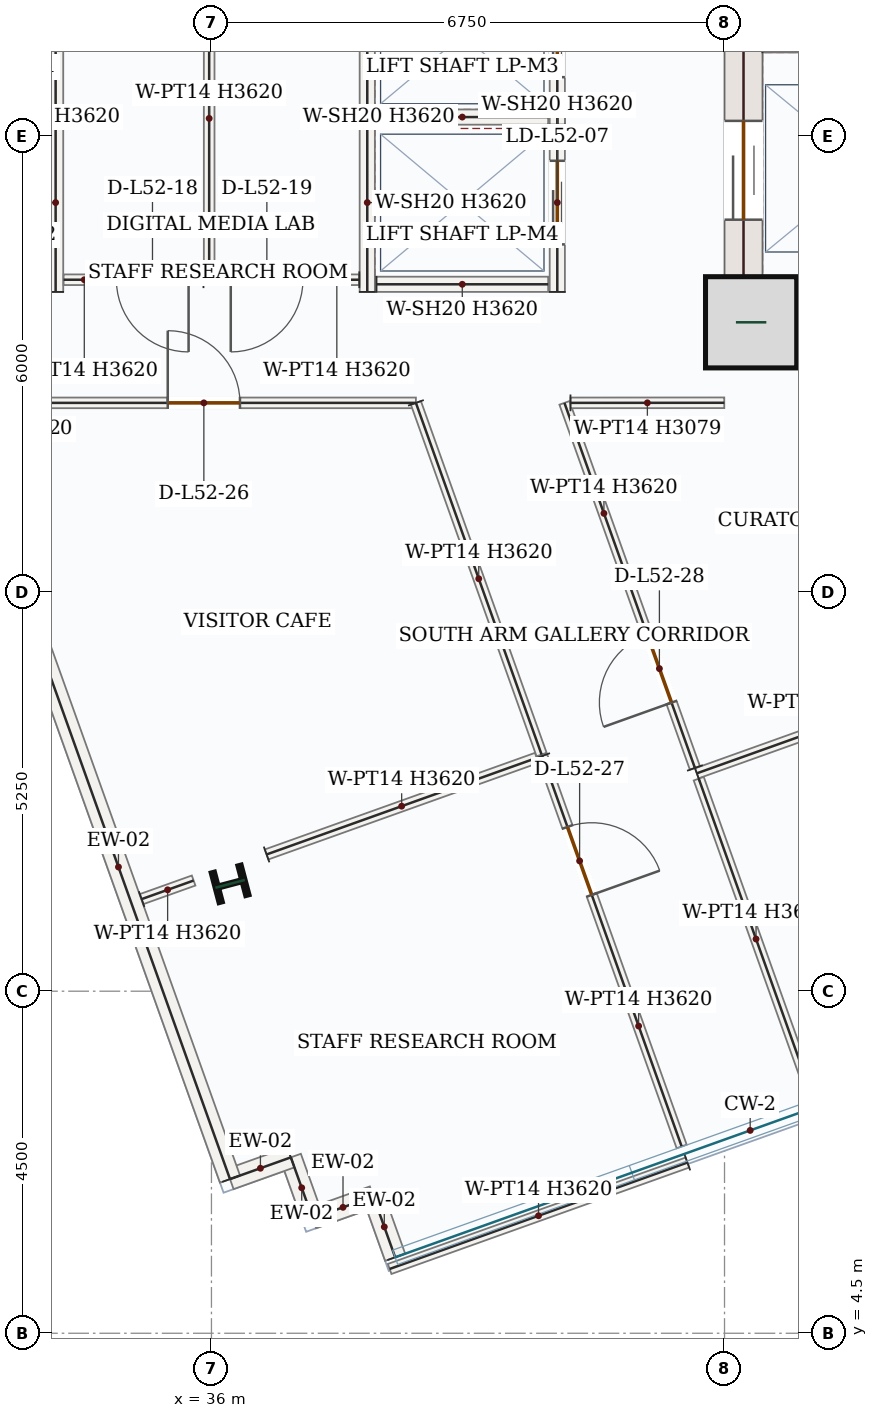
"""IFC4 building model, lengths in metres.
Left out: names, types, materials, properties, quantities, classifications, styles, units other than length and angle.
Written with IfcOpenShell. Run it as: python <this file> out.ifc"""

import sys

from ifc_helpers import new_model, si_unit, direction, frame, frame_2d, origin, origin_2d, place, context, subcontext, project, spatial, rectangle, i_section, extrude, source, transform, mapped, element, fill, save


model = new_model("IFC4")
c1 = context("Model", 3, precision=1e-05, world=origin(), true_north=direction((0.0, 1.0)))
c2 = subcontext(c1, "Body", "Model", "MODEL_VIEW")
j1 = project(units=[si_unit("LENGTHUNIT", "METRE"), si_unit("PLANEANGLEUNIT", "RADIAN")], contexts=[c1])
p1 = place(None, origin())
s1 = spatial("IfcSite", under=j1, at=p1, CompositionType="ELEMENT")
p2 = place(p1, origin())
s2 = spatial("IfcBuilding", under=s1, at=p2, CompositionType="ELEMENT")
p3 = place(p2, frame((0.0, 0.0, 221.4)))
s3 = spatial("IfcBuildingStorey", under=s2, at=p3, CompositionType="ELEMENT", Elevation=221.4)
p4 = place(p3, frame((43.0, 17.4, 0.0), z_axis=(0.0, 0.0, 1.0), x_axis=(0.0, 1.0, 0.0)))
e1 = element("IfcWall", 1, at=p4, inside=s3, PredefinedType="SHEAR", context=c2, shape_type="SweptSolid", body=[
    extrude(rectangle(XDim=8.55, YDim=0.5, at=frame_2d((4.275, 0.0))), origin(), (0.0, 0.0, 1.0), 3.62),
])
p5 = place(p4, frame((6.65, 0.0, 0.0)))
e2 = element("IfcOpeningElement", 2, at=p5, cuts=e1, PredefinedType="OPENING", context=c2, shape_type="SweptSolid", body=[
    extrude(rectangle(XDim=1.1, YDim=2.2, at=frame_2d((0.55, 1.1))), frame((0.0, 0.26, 0.0), z_axis=(0.0, -1.0, 0.0), x_axis=(1.0, 0.0, 0.0)), (0.0, 0.0, 1.0), 0.52),
])
p6 = place(p4, frame((1.75, 0.0, 0.0)))
e3 = element("IfcOpeningElement", 3, at=p6, cuts=e1, PredefinedType="OPENING", context=c2, shape_type="SweptSolid", body=[
    extrude(rectangle(XDim=1.3, YDim=2.2, at=frame_2d((0.65, 1.1))), frame((0.0, 0.26, 0.0), z_axis=(0.0, -1.0, 0.0), x_axis=(1.0, 0.0, 0.0)), (0.0, 0.0, 1.0), 0.52),
])
p7 = place(p4, frame((4.55, 0.0, 0.0)))
e4 = element("IfcOpeningElement", 4, at=p7, cuts=e1, PredefinedType="OPENING", context=c2, shape_type="SweptSolid", body=[
    extrude(rectangle(XDim=0.88, YDim=2.1, at=frame_2d((0.44, 1.05))), frame((0.0, 0.26, 0.0), z_axis=(0.0, -1.0, 0.0), x_axis=(1.0, 0.0, 0.0)), (0.0, 0.0, 1.0), 0.52),
])
m1 = source(origin(), c2, "Body", "SweptSolid", [
    extrude(rectangle(XDim=7.0, YDim=0.5, at=frame_2d((3.5, 0.0))), origin(), (0.0, 0.0, 1.0), 3.62),
])
p8 = place(p3, frame((43.25, 17.65, 0.0), z_axis=(0.0, 0.0, 1.0), x_axis=(1.0, 0.0, 0.0)))
e5 = element("IfcWall", 5, at=p8, inside=s3, PredefinedType="SHEAR", context=c2, shape_type="MappedRepresentation", body=[
    mapped(m1, transform((0.0, 0.0, 0.0), x_axis=(1.0, 0.0, 0.0), y_axis=(0.0, 1.0, 0.0), z_axis=(0.0, 0.0, 1.0), scale=1.0)),
])
m2 = source(origin(), c2, "Body", "SweptSolid", [
    extrude(rectangle(XDim=1.2, YDim=1.2, at=origin_2d()), origin(), (0.0, 0.0, 1.0), 3.9),
])
p9 = place(p3, frame((43.1, 17.8, 0.0), z_axis=(0.0, 0.0, 1.0), x_axis=(1.0, 0.0, 0.0)))
e6 = element("IfcColumn", 6, at=p9, inside=s3, PredefinedType="COLUMN", context=c2, shape_type="MappedRepresentation", body=[
    mapped(m2, transform((0.0, 0.0, 0.0), x_axis=(1.0, 0.0, 0.0), y_axis=(0.0, 1.0, 0.0), z_axis=(0.0, 0.0, 1.0), scale=1.0)),
])
m3 = source(origin(), c2, "Body", "SweptSolid", [
    extrude(i_section(OverallWidth=0.404, OverallDepth=0.407, WebThickness=0.027, FlangeThickness=0.044, FilletRadius=0.018, at=origin_2d()), origin(), (0.0, 0.0, 1.0), 3.9),
])
p10 = place(p3, frame((36.245, 10.412, 0.0), z_axis=(0.0, 0.0, 1.0), x_axis=(-0.255445757936, 0.966823388604, 0.0)))
e7 = element("IfcColumn", 7, at=p10, inside=s3, PredefinedType="COLUMN", context=c2, shape_type="MappedRepresentation", body=[
    mapped(m3, transform((0.0, 0.0, 0.0), x_axis=(1.0, 0.0, 0.0), y_axis=(0.0, 1.0, 0.0), z_axis=(0.0, 0.0, 1.0), scale=1.0)),
])
m4 = source(origin(), c2, "Body", "SweptSolid", [
    extrude(rectangle(XDim=0.85, YDim=0.28, at=frame_2d((0.425, 0.0))), origin(), (0.0, 0.0, 1.0), 3.62),
])
for number, where, z_axis, x_axis in (
    (8, (38.417, 5.499, 0.0), (0.0, 0.0, 1.0), (-0.336, 0.942, 0.0)),
    (9, (38.131, 6.3, 0.0), (0.0, 0.0, 1.0), (-0.942, -0.337, 0.0)),
):
    element("IfcWall", number, at=place(p3, frame(where, z_axis=z_axis, x_axis=x_axis)), inside=s3, PredefinedType="SOLIDWALL", context=c2, shape_type="MappedRepresentation", body=[
        mapped(m4, transform((0.0, 0.0, 0.0), x_axis=(1.0, 0.0, 0.0), y_axis=(0.0, 1.0, 0.0), z_axis=(0.0, 0.0, 1.0), scale=1.0)),
    ])
m5 = source(origin(), c2, "Body", "SweptSolid", [
    extrude(rectangle(XDim=0.85, YDim=0.28, at=frame_2d((0.425, 0.0))), origin(), (0.0, 0.0, 1.0), 3.62),
])
for number, where, z_axis, x_axis in (
    (10, (37.331, 6.014, 0.0), (0.0, 0.0, 1.0), (-0.337, 0.942, 0.0)),
    (11, (37.044, 6.814, 0.0), (0.0, 0.0, 1.0), (-0.942, -0.337, 0.0)),
):
    element("IfcWall", number, at=place(p3, frame(where, z_axis=z_axis, x_axis=x_axis)), inside=s3, PredefinedType="SOLIDWALL", context=c2, shape_type="MappedRepresentation", body=[
        mapped(m5, transform((0.0, 0.0, 0.0), x_axis=(1.0, 0.0, 0.0), y_axis=(0.0, 1.0, 0.0), z_axis=(0.0, 0.0, 1.0), scale=1.0)),
    ])
m6 = source(origin(), c2, "Body", "SweptSolid", [
    extrude(rectangle(XDim=8.721, YDim=0.28, at=frame_2d((4.36, 0.0))), origin(), (0.0, 0.0, 1.0), 3.62),
])
p11 = place(p3, frame((36.244, 6.528, 0.0), z_axis=(0.0, 0.0, 1.0), x_axis=(-0.336554520074, 0.941663982011, 0.0)))
e12 = element("IfcWall", 12, at=p11, inside=s3, PredefinedType="SOLIDWALL", context=c2, shape_type="MappedRepresentation", body=[
    mapped(m6, transform((0.0, 0.0, 0.0), x_axis=(1.0, 0.0, 0.0), y_axis=(0.0, 1.0, 0.0), z_axis=(0.0, 0.0, 1.0), scale=1.0)),
])
m7 = source(origin(), c2, "Body", "SweptSolid", [
    extrude(rectangle(XDim=2.75, YDim=0.2, at=frame_2d((1.375, 0.0))), origin(), (0.0, 0.0, 1.0), 3.62),
])
p12 = place(p3, frame((43.25, 21.45, 0.0), z_axis=(0.0, 0.0, 1.0), x_axis=(1.0, 0.0, 0.0)))
e13 = element("IfcWall", 13, at=p12, inside=s3, PredefinedType="SOLIDWALL", context=c2, shape_type="MappedRepresentation", body=[
    mapped(m7, transform((0.0, 0.0, 0.0), x_axis=(1.0, 0.0, 0.0), y_axis=(0.0, 1.0, 0.0), z_axis=(0.0, 0.0, 1.0), scale=1.0)),
])
m8 = source(origin(), c2, "Body", "SweptSolid", [
    extrude(rectangle(XDim=2.35, YDim=0.2, at=frame_2d((1.175, 0.0))), origin(), (0.0, 0.0, 1.0), 3.62),
])
for number, where, z_axis, x_axis in (
    (14, (33.95, 20.4, 0.0), (0.0, 0.0, 1.0), (0.0, 1.0, 0.0)),
    (15, (33.95, 18.2, 0.0), (0.0, 0.0, 1.0), (0.0, 1.0, 0.0)),
    (16, (38.05, 20.4, 0.0), (0.0, 0.0, 1.0), (0.0, 1.0, 0.0)),
):
    element("IfcWall", number, at=place(p3, frame(where, z_axis=z_axis, x_axis=x_axis)), inside=s3, PredefinedType="SOLIDWALL", context=c2, shape_type="MappedRepresentation", body=[
        mapped(m8, transform((0.0, 0.0, 0.0), x_axis=(1.0, 0.0, 0.0), y_axis=(0.0, 1.0, 0.0), z_axis=(0.0, 0.0, 1.0), scale=1.0)),
    ])
p13 = place(p3, frame((40.55, 20.4, 0.0), z_axis=(0.0, 0.0, 1.0), x_axis=(0.0, 1.0, 0.0)))
e17 = element("IfcWall", 17, at=p13, inside=s3, PredefinedType="SOLIDWALL", context=c2, shape_type="SweptSolid", body=[
    extrude(rectangle(XDim=2.35, YDim=0.2, at=frame_2d((1.175, 0.0))), origin(), (0.0, 0.0, 1.0), 3.62),
])
p14 = place(p13, frame((0.625, 0.0, 0.0)))
e18 = element("IfcOpeningElement", 18, at=p14, cuts=e17, PredefinedType="OPENING", context=c2, shape_type="SweptSolid", body=[
    extrude(rectangle(XDim=1.1, YDim=2.15, at=frame_2d((0.55, 1.075))), frame((0.0, 0.11, 0.0), z_axis=(0.0, -1.0, 0.0), x_axis=(1.0, 0.0, 0.0)), (0.0, 0.0, 1.0), 0.22),
])
m9 = source(origin(), c2, "Body", "SweptSolid", [
    extrude(rectangle(XDim=2.26, YDim=0.2, at=frame_2d((1.13, 0.0))), origin(), (0.0, 0.0, 1.0), 3.62),
])
p15 = place(p3, frame((38.17, 20.5, 0.0), z_axis=(0.0, 0.0, 1.0), x_axis=(1.0, 0.0, 0.0)))
e19 = element("IfcWall", 19, at=p15, inside=s3, PredefinedType="SOLIDWALL", context=c2, shape_type="MappedRepresentation", body=[
    mapped(m9, transform((0.0, 0.0, 0.0), x_axis=(1.0, 0.0, 0.0), y_axis=(0.0, 1.0, 0.0), z_axis=(0.0, 0.0, 1.0), scale=1.0)),
])
p16 = place(p3, frame((38.05, 18.2, 0.0), z_axis=(0.0, 0.0, 1.0), x_axis=(0.0, 1.0, 0.0)))
e20 = element("IfcWall", 20, at=p16, inside=s3, PredefinedType="SOLIDWALL", context=c2, shape_type="MappedRepresentation", body=[
    mapped(m8, transform((0.0, 0.0, 0.0), x_axis=(1.0, 0.0, 0.0), y_axis=(0.0, 1.0, 0.0), z_axis=(0.0, 0.0, 1.0), scale=1.0)),
])
p17 = place(p3, frame((40.55, 18.2, 0.0), z_axis=(0.0, 0.0, 1.0), x_axis=(0.0, 1.0, 0.0)))
e21 = element("IfcWall", 21, at=p17, inside=s3, PredefinedType="SOLIDWALL", context=c2, shape_type="SweptSolid", body=[
    extrude(rectangle(XDim=2.35, YDim=0.2, at=frame_2d((1.175, 0.0))), origin(), (0.0, 0.0, 1.0), 3.62),
])
p18 = place(p17, frame((0.625, 0.0, 0.0)))
e22 = element("IfcOpeningElement", 22, at=p18, cuts=e21, PredefinedType="OPENING", context=c2, shape_type="SweptSolid", body=[
    extrude(rectangle(XDim=1.1, YDim=2.15, at=frame_2d((0.55, 1.075))), frame((0.0, 0.11, 0.0), z_axis=(0.0, -1.0, 0.0), x_axis=(1.0, 0.0, 0.0)), (0.0, 0.0, 1.0), 0.22),
])
p19 = place(p3, frame((38.17, 18.3, 0.0), z_axis=(0.0, 0.0, 1.0), x_axis=(1.0, 0.0, 0.0)))
e23 = element("IfcWall", 23, at=p19, inside=s3, PredefinedType="SOLIDWALL", context=c2, shape_type="MappedRepresentation", body=[
    mapped(m9, transform((0.0, 0.0, 0.0), x_axis=(1.0, 0.0, 0.0), y_axis=(0.0, 1.0, 0.0), z_axis=(0.0, 0.0, 1.0), scale=1.0)),
])
m10 = source(origin(), c2, "Body", "SweptSolid", [
    extrude(rectangle(XDim=4.245, YDim=0.14, at=frame_2d((2.123, 0.0))), origin(), (0.0, 0.0, 1.0), 3.62),
])
p20 = place(p3, frame((35.97, 22.605, 0.0), z_axis=(0.0, 0.0, 1.0), x_axis=(0.0, -1.0, 0.0)))
e24 = element("IfcWall", 24, at=p20, inside=s3, PredefinedType="PARTITIONING", context=c2, shape_type="MappedRepresentation", body=[
    mapped(m10, transform((0.0, 0.0, 0.0), x_axis=(1.0, 0.0, 0.0), y_axis=(0.0, 1.0, 0.0), z_axis=(0.0, 0.0, 1.0), scale=1.0)),
])
p21 = place(p3, frame((35.895, 18.36, 0.0), z_axis=(0.0, 0.0, 1.0), x_axis=(-1.0, 0.0, 0.0)))
e25 = element("IfcWall", 25, at=p21, inside=s3, PredefinedType="PARTITIONING", context=c2, shape_type="SweptSolid", body=[
    extrude(rectangle(XDim=1.84, YDim=0.14, at=frame_2d((0.92, 0.0))), origin(), (0.0, 0.0, 1.0), 3.62),
])
p22 = place(p21, frame((0.196, 0.0, 0.0)))
e26 = element("IfcOpeningElement", 26, at=p22, cuts=e25, PredefinedType="OPENING", context=c2, shape_type="SweptSolid", body=[
    extrude(rectangle(XDim=0.95, YDim=2.15, at=frame_2d((0.475, 1.075))), frame((0.0, 0.08, 0.0), z_axis=(0.0, -1.0, 0.0), x_axis=(1.0, 0.0, 0.0)), (0.0, 0.0, 1.0), 0.16),
])
p23 = place(p3, frame((37.945, 18.36, 0.0), z_axis=(0.0, 0.0, 1.0), x_axis=(-1.0, 0.0, 0.0)))
e27 = element("IfcWall", 27, at=p23, inside=s3, PredefinedType="PARTITIONING", context=c2, shape_type="SweptSolid", body=[
    extrude(rectangle(XDim=1.9, YDim=0.14, at=frame_2d((0.95, 0.0))), origin(), (0.0, 0.0, 1.0), 3.62),
])
p24 = place(p23, frame((0.741, 0.0, 0.0)))
e28 = element("IfcOpeningElement", 28, at=p24, cuts=e27, PredefinedType="OPENING", context=c2, shape_type="SweptSolid", body=[
    extrude(rectangle(XDim=0.95, YDim=2.15, at=frame_2d((0.475, 1.075))), frame((0.0, 0.08, 0.0), z_axis=(0.0, -1.0, 0.0), x_axis=(1.0, 0.0, 0.0)), (0.0, 0.0, 1.0), 0.16),
])
p25 = place(p3, frame((42.386, 11.866, 0.0), z_axis=(0.0, 0.0, 1.0), x_axis=(0.94166093099, 0.336563056568, 0.0)))
e29 = element("IfcWall", 29, at=p25, inside=s3, PredefinedType="PARTITIONING", context=c2, shape_type="SweptSolid", body=[
    extrude(rectangle(XDim=5.595, YDim=0.14, at=frame_2d((2.797, 0.0))), origin(), (0.0, 0.0, 1.0), 3.62),
])
p26 = place(p25, frame((3.623, 0.0, 0.0)))
e30 = element("IfcOpeningElement", 30, at=p26, cuts=e29, PredefinedType="OPENING", context=c2, shape_type="SweptSolid", body=[
    extrude(rectangle(XDim=0.95, YDim=2.15, at=frame_2d((0.475, 1.075))), frame((0.0, 0.08, 0.0), z_axis=(0.0, -1.0, 0.0), x_axis=(1.0, 0.0, 0.0)), (0.0, 0.0, 1.0), 0.16),
])
m11 = source(origin(), c2, "Body", "SweptSolid", [
    extrude(rectangle(XDim=4.48, YDim=0.14, at=frame_2d((2.24, 0.0))), origin(), (0.0, 0.0, 1.0), 3.62),
])
p27 = place(p3, frame((43.919, 7.577, 0.0), z_axis=(0.0, 0.0, 1.0), x_axis=(-0.336557324255, 0.941662979781, 0.0)))
e31 = element("IfcWall", 31, at=p27, inside=s3, PredefinedType="PARTITIONING", context=c2, shape_type="MappedRepresentation", body=[
    mapped(m11, transform((0.0, 0.0, 0.0), x_axis=(1.0, 0.0, 0.0), y_axis=(0.0, 1.0, 0.0), z_axis=(0.0, 0.0, 1.0), scale=1.0)),
])
p28 = place(p3, frame((40.35, 12.094, 0.0), z_axis=(0.0, 0.0, 1.0), x_axis=(0.336563203689, -0.941660878407, 0.0)))
e32 = element("IfcWall", 32, at=p28, inside=s3, PredefinedType="PARTITIONING", context=c2, shape_type="SweptSolid", body=[
    extrude(rectangle(XDim=5.455, YDim=0.14, at=frame_2d((2.728, 0.0))), origin(), (0.0, 0.0, 1.0), 3.62),
])
p29 = place(p28, frame((0.991, 0.0, 0.0)))
e33 = element("IfcOpeningElement", 33, at=p29, cuts=e32, PredefinedType="OPENING", context=c2, shape_type="SweptSolid", body=[
    extrude(rectangle(XDim=0.95, YDim=2.15, at=frame_2d((0.475, 1.075))), frame((0.0, 0.08, 0.0), z_axis=(0.0, -1.0, 0.0), x_axis=(1.0, 0.0, 0.0)), (0.0, 0.0, 1.0), 0.16),
])
m12 = source(origin(), c2, "Body", "SweptSolid", [
    extrude(rectangle(XDim=4.16, YDim=0.14, at=frame_2d((2.08, 0.0))), origin(), (0.0, 0.0, 1.0), 3.62),
])
p30 = place(p3, frame((42.262, 6.746, 0.0), z_axis=(0.0, 0.0, 1.0), x_axis=(-0.94167417377, -0.336526002642, 0.0)))
e34 = element("IfcWall", 34, at=p30, inside=s3, PredefinedType="PARTITIONING", context=c2, shape_type="MappedRepresentation", body=[
    mapped(m12, transform((0.0, 0.0, 0.0), x_axis=(1.0, 0.0, 0.0), y_axis=(0.0, 1.0, 0.0), z_axis=(0.0, 0.0, 1.0), scale=1.0)),
])
m13 = source(origin(), c2, "Body", "SweptSolid", [
    extrude(rectangle(XDim=0.726, YDim=0.14, at=frame_2d((0.363, 0.0))), origin(), (0.0, 0.0, 1.0), 3.62),
])
p31 = place(p3, frame((35.082, 10.212, 0.0), z_axis=(0.0, 0.0, 1.0), x_axis=(0.941779940629, 0.33622989669, 0.0)))
e35 = element("IfcWall", 35, at=p31, inside=s3, PredefinedType="PARTITIONING", context=c2, shape_type="MappedRepresentation", body=[
    mapped(m13, transform((0.0, 0.0, 0.0), x_axis=(1.0, 0.0, 0.0), y_axis=(0.0, 1.0, 0.0), z_axis=(0.0, 0.0, 1.0), scale=1.0)),
])
m14 = source(origin(), c2, "Body", "SweptSolid", [
    extrude(rectangle(XDim=3.774, YDim=0.14, at=frame_2d((1.887, 0.0))), origin(), (0.0, 0.0, 1.0), 3.62),
])
p32 = place(p3, frame((36.725, 10.799, 0.0), z_axis=(0.0, 0.0, 1.0), x_axis=(0.94166578898, 0.336549464216, 0.0)))
e36 = element("IfcWall", 36, at=p32, inside=s3, PredefinedType="PARTITIONING", context=c2, shape_type="MappedRepresentation", body=[
    mapped(m14, transform((0.0, 0.0, 0.0), x_axis=(1.0, 0.0, 0.0), y_axis=(0.0, 1.0, 0.0), z_axis=(0.0, 0.0, 1.0), scale=1.0)),
])
p33 = place(p3, frame((31.126, 16.74, 0.0), z_axis=(0.0, 0.0, 1.0), x_axis=(1.0, 0.0, 0.0)))
e37 = element("IfcWall", 37, at=p33, inside=s3, PredefinedType="PARTITIONING", context=c2, shape_type="SweptSolid", body=[
    extrude(rectangle(XDim=7.564, YDim=0.14, at=frame_2d((3.782, 0.0))), origin(), (0.0, 0.0, 1.0), 3.62),
])
p34 = place(p33, frame((4.299, 0.0, 0.0)))
e38 = element("IfcOpeningElement", 38, at=p34, cuts=e37, PredefinedType="OPENING", context=c2, shape_type="SweptSolid", body=[
    extrude(rectangle(XDim=0.95, YDim=2.15, at=frame_2d((0.475, 1.075))), frame((0.0, 0.08, 0.0), z_axis=(0.0, -1.0, 0.0), x_axis=(1.0, 0.0, 0.0)), (0.0, 0.0, 1.0), 0.16),
])
m15 = source(origin(), c2, "Body", "SweptSolid", [
    extrude(rectangle(XDim=4.913, YDim=0.14, at=frame_2d((2.457, 0.0))), origin(), (0.0, 0.0, 1.0), 3.62),
])
p35 = place(p3, frame((38.69, 16.74, 0.0), z_axis=(0.0, 0.0, 1.0), x_axis=(0.336547288081, -0.941666566724, 0.0)))
e39 = element("IfcWall", 39, at=p35, inside=s3, PredefinedType="PARTITIONING", context=c2, shape_type="MappedRepresentation", body=[
    mapped(m15, transform((0.0, 0.0, 0.0), x_axis=(1.0, 0.0, 0.0), y_axis=(0.0, 1.0, 0.0), z_axis=(0.0, 0.0, 1.0), scale=1.0)),
])
p36 = place(p3, frame((42.361, 11.937, 0.0), z_axis=(0.0, 0.0, 1.0), x_axis=(-0.336588056289, 0.941651995359, 0.0)))
e40 = element("IfcWall", 40, at=p36, inside=s3, PredefinedType="PARTITIONING", context=c2, shape_type="SweptSolid", body=[
    extrude(rectangle(XDim=5.101, YDim=0.14, at=frame_2d((2.55, 0.0))), origin(), (0.0, 0.0, 1.0), 3.62),
])
p37 = place(p36, frame((0.913, 0.0, 0.0)))
e41 = element("IfcOpeningElement", 41, at=p37, cuts=e40, PredefinedType="OPENING", context=c2, shape_type="SweptSolid", body=[
    extrude(rectangle(XDim=0.95, YDim=2.15, at=frame_2d((0.475, 1.075))), frame((0.0, 0.08, 0.0), z_axis=(0.0, -1.0, 0.0), x_axis=(1.0, 0.0, 0.0)), (0.0, 0.0, 1.0), 0.16),
])
m16 = source(origin(), c2, "Body", "SweptSolid", [
    extrude(rectangle(XDim=2.023, YDim=0.14, at=frame_2d((1.012, 0.0))), origin(), (0.0, 0.0, 1.0), 3.079),
])
p38 = place(p3, frame((40.723, 16.74, 0.0), z_axis=(0.0, 0.0, 1.0), x_axis=(0.999999817982, 0.000603354542, 0.0)))
e42 = element("IfcWall", 42, at=p38, inside=s3, PredefinedType="PARTITIONING", context=c2, shape_type="MappedRepresentation", body=[
    mapped(m16, transform((0.0, 0.0, 0.0), x_axis=(1.0, 0.0, 0.0), y_axis=(0.0, 1.0, 0.0), z_axis=(0.0, 0.0, 1.0), scale=1.0)),
])
m17 = source(origin(), c2, "Body", "SweptSolid", [
    extrude(rectangle(XDim=1.3, YDim=2.2, at=frame_2d((0.65, 1.1))), frame((0.0, 0.025, 0.0), z_axis=(0.0, -1.0, 0.0), x_axis=(1.0, 0.0, 0.0)), (0.0, 0.0, 1.0), 0.05),
])
p39 = place(p6, origin())
e43 = element("IfcDoor", 43, at=p39, inside=s3, OperationType="DOUBLE_DOOR_SLIDING", PredefinedType="DOOR", context=c2, shape_type="MappedRepresentation", body=[
    mapped(m17, transform((0.0, 0.0, 0.0), x_axis=(1.0, 0.0, 0.0), y_axis=(0.0, 1.0, 0.0), z_axis=(0.0, 0.0, 1.0), scale=1.0)),
])
fill(e3, e43)
m18 = source(origin(), c2, "Body", "SweptSolid", [
    extrude(rectangle(XDim=1.1, YDim=2.15, at=frame_2d((0.55, 1.075))), frame((0.0, 0.025, 0.0), z_axis=(0.0, -1.0, 0.0), x_axis=(1.0, 0.0, 0.0)), (0.0, 0.0, 1.0), 0.05),
])
p40 = place(p14, origin())
e44 = element("IfcDoor", 44, at=p40, inside=s3, OperationType="DOUBLE_DOOR_SLIDING", PredefinedType="DOOR", context=c2, shape_type="MappedRepresentation", body=[
    mapped(m18, transform((0.0, 0.0, 0.0), x_axis=(1.0, 0.0, 0.0), y_axis=(0.0, 1.0, 0.0), z_axis=(0.0, 0.0, 1.0), scale=1.0)),
])
fill(e18, e44)
p41 = place(p18, origin())
e45 = element("IfcDoor", 45, at=p41, inside=s3, OperationType="DOUBLE_DOOR_SLIDING", PredefinedType="DOOR", context=c2, shape_type="MappedRepresentation", body=[
    mapped(m18, transform((0.0, 0.0, 0.0), x_axis=(1.0, 0.0, 0.0), y_axis=(0.0, 1.0, 0.0), z_axis=(0.0, 0.0, 1.0), scale=1.0)),
])
fill(e22, e45)
m19 = source(origin(), c2, "Body", "SweptSolid", [
    extrude(rectangle(XDim=0.95, YDim=2.15, at=frame_2d((0.475, 1.075))), frame((0.0, 0.025, 0.0), z_axis=(0.0, -1.0, 0.0), x_axis=(1.0, 0.0, 0.0)), (0.0, 0.0, 1.0), 0.05),
])
p42 = place(p22, origin())
e46 = element("IfcDoor", 46, at=p42, inside=s3, OperationType="SINGLE_SWING_LEFT", PredefinedType="DOOR", context=c2, shape_type="MappedRepresentation", body=[
    mapped(m19, transform((0.0, 0.0, 0.0), x_axis=(1.0, 0.0, 0.0), y_axis=(0.0, 1.0, 0.0), z_axis=(0.0, 0.0, 1.0), scale=1.0)),
])
fill(e26, e46)
p43 = place(p24, origin())
e47 = element("IfcDoor", 47, at=p43, inside=s3, OperationType="SINGLE_SWING_RIGHT", PredefinedType="DOOR", context=c2, shape_type="MappedRepresentation", body=[
    mapped(m19, transform((0.0, 0.0, 0.0), x_axis=(1.0, 0.0, 0.0), y_axis=(0.0, 1.0, 0.0), z_axis=(0.0, 0.0, 1.0), scale=1.0)),
])
fill(e28, e47)
p44 = place(p34, origin())
e48 = element("IfcDoor", 48, at=p44, inside=s3, OperationType="SINGLE_SWING_LEFT", PredefinedType="DOOR", context=c2, shape_type="MappedRepresentation", body=[
    mapped(m19, transform((0.0, 0.0, 0.0), x_axis=(1.0, 0.0, 0.0), y_axis=(0.0, 1.0, 0.0), z_axis=(0.0, 0.0, 1.0), scale=1.0)),
])
fill(e38, e48)
p45 = place(p29, origin())
e49 = element("IfcDoor", 49, at=p45, inside=s3, OperationType="SINGLE_SWING_RIGHT", PredefinedType="DOOR", context=c2, shape_type="MappedRepresentation", body=[
    mapped(m19, transform((0.0, 0.0, 0.0), x_axis=(1.0, 0.0, 0.0), y_axis=(0.0, 1.0, 0.0), z_axis=(0.0, 0.0, 1.0), scale=1.0)),
])
fill(e33, e49)
p46 = place(p37, origin())
e50 = element("IfcDoor", 50, at=p46, inside=s3, OperationType="SINGLE_SWING_LEFT", PredefinedType="DOOR", context=c2, shape_type="MappedRepresentation", body=[
    mapped(m19, transform((0.0, 0.0, 0.0), x_axis=(1.0, 0.0, 0.0), y_axis=(0.0, 1.0, 0.0), z_axis=(0.0, 0.0, 1.0), scale=1.0)),
])
fill(e41, e50)
save(model, sys.argv[1])
